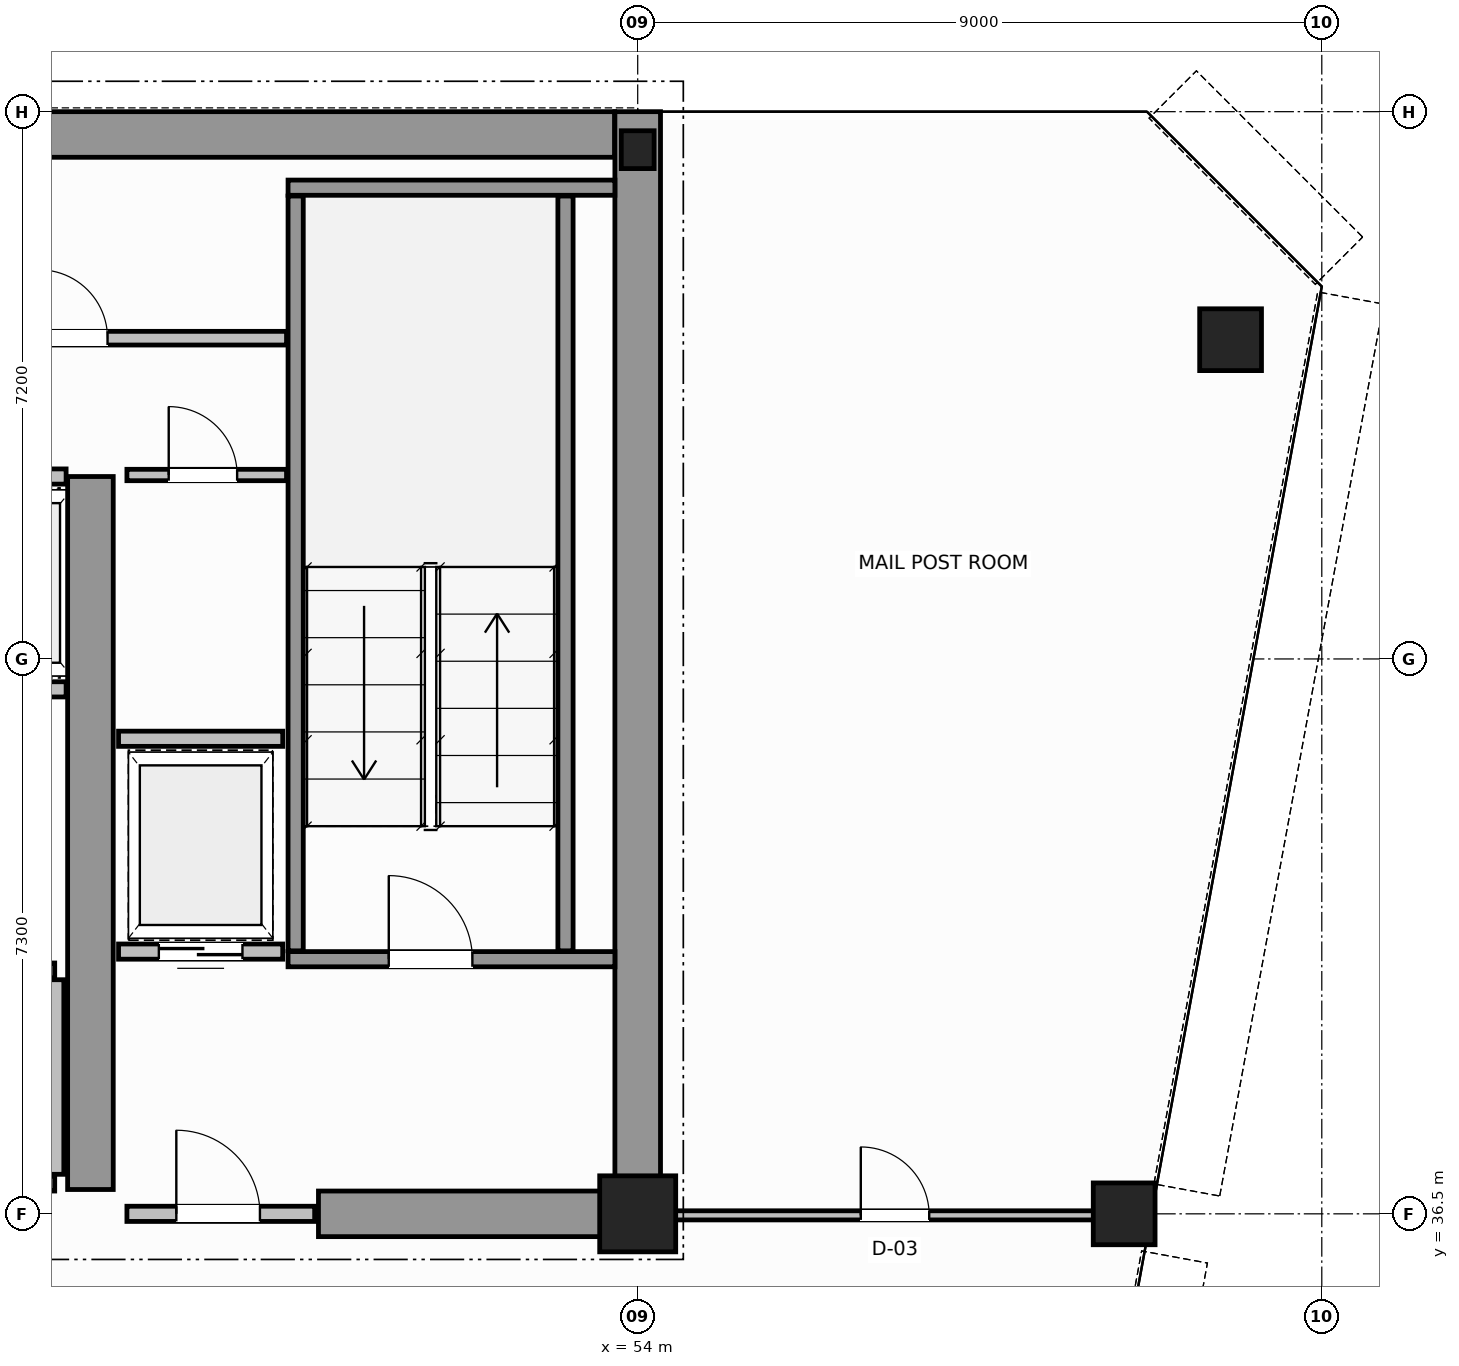
"""IFC4 building model, lengths in metres.
Left out: names, types, materials, properties, quantities, classifications, styles, units other than length and angle.
Written with IfcOpenShell. Run it as: python <this file> out.ifc"""

import sys

from ifc_helpers import new_model, si_unit, direction, frame, frame_2d, origin, origin_2d, place, context, subcontext, project, spatial, rectangle, hollow_circle, i_section, extrude, source, transform, mapped, element, fill, save


model = new_model("IFC4")
c1 = context("Model", 3, precision=1e-05, world=origin(), true_north=direction((0.0, 1.0)))
c2 = subcontext(c1, "Body", "Model", "MODEL_VIEW")
j1 = project(units=[si_unit("LENGTHUNIT", "METRE"), si_unit("PLANEANGLEUNIT", "RADIAN")], contexts=[c1])
p1 = place(None, origin())
s1 = spatial("IfcSite", under=j1, at=p1, CompositionType="ELEMENT")
p2 = place(p1, origin())
s2 = spatial("IfcBuilding", under=s1, at=p2, CompositionType="ELEMENT")
p3 = place(p2, frame((0.0, 0.0, 203.2)))
s3 = spatial("IfcBuildingStorey", under=s2, at=p3, CompositionType="ELEMENT", Elevation=203.2)
m1 = source(origin(), c2, "Body", "SweptSolid", [
    extrude(rectangle(XDim=1.0, YDim=1.0, at=origin_2d()), origin(), (0.0, 0.0, 1.0), 3.8),
])
p4 = place(p3, frame((54.0, 36.5, 0.0), z_axis=(0.0, 0.0, 1.0), x_axis=(1.0, 0.0, 0.0)))
e1 = element("IfcColumn", 1, at=p4, inside=s3, PredefinedType="COLUMN", context=c2, shape_type="MappedRepresentation", body=[
    mapped(m1, transform((0.0, 0.0, 0.0), scale=1.0)),
])
m2 = source(origin(), c2, "Body", "SweptSolid", [
    extrude(i_section(OverallWidth=0.432, OverallDepth=0.498, WebThickness=0.055, FlangeThickness=0.068, FilletRadius=0.015, at=origin_2d()), origin(), (0.0, 0.0, 1.0), 3.8),
])
p5 = place(p3, frame((54.0, 50.5, 0.0), z_axis=(0.0, 0.0, 1.0), x_axis=(1.0, 0.0, 0.0)))
e2 = element("IfcColumn", 2, at=p5, inside=s3, PredefinedType="COLUMN", context=c2, shape_type="MappedRepresentation", body=[
    mapped(m2, transform((0.0, 0.0, 0.0), scale=1.0)),
])
m3 = source(origin(), c2, "Body", "SweptSolid", [
    extrude(hollow_circle(Radius=0.406, WallThickness=0.04, at=origin_2d()), origin(), (0.0, 0.0, 1.0), 3.8),
])
for number, where, z_axis, x_axis in (
    (3, (61.8, 48.0, 0.0), (0.0, 0.0, 1.0), (1.0, 0.0, 0.0)),
    (4, (60.4, 36.5, 0.0), (0.0, 0.0, 1.0), (1.0, 0.0, 0.0)),
):
    element("IfcColumn", number, at=place(p3, frame(where, z_axis=z_axis, x_axis=x_axis)), inside=s3, PredefinedType="COLUMN", context=c2, shape_type="MappedRepresentation", body=[
        mapped(m3, transform((0.0, 0.0, 0.0), scale=1.0)),
    ])
p6 = place(p3, frame((34.002, 50.7, 0.0), z_axis=(0.0, 0.0, 1.0), x_axis=(1.0, 0.0, 0.0)))
e5 = element("IfcWall", 5, at=p6, inside=s3, PredefinedType="SHEAR", context=c2, shape_type="SweptSolid", body=[
    extrude(rectangle(XDim=19.694, YDim=0.6, at=frame_2d((9.847, 0.0))), origin(), (0.0, 0.0, 1.0), 3.8),
])
p7 = place(p3, frame((54.0, 36.5, 0.0), z_axis=(0.0, 0.0, 1.0), x_axis=(0.0, 1.0, 0.0)))
e6 = element("IfcWall", 6, at=p7, inside=s3, PredefinedType="SHEAR", context=c2, shape_type="SweptSolid", body=[
    extrude(rectangle(XDim=14.5, YDim=0.6, at=frame_2d((7.25, 0.0))), origin(), (0.0, 0.0, 1.0), 3.8),
])
p8 = place(p3, frame((49.8, 36.5, 0.0), z_axis=(0.0, 0.0, 1.0), x_axis=(1.0, 0.0, 0.0)))
e7 = element("IfcWall", 7, at=p8, inside=s3, PredefinedType="SHEAR", context=c2, shape_type="SweptSolid", body=[
    extrude(rectangle(XDim=3.88, YDim=0.6, at=frame_2d((1.94, 0.0))), origin(), (0.0, 0.0, 1.0), 2.58),
])
p9 = place(p3, frame((46.8, 36.82, 0.0), z_axis=(0.0, 0.0, 1.0), x_axis=(0.0, 1.0, 0.0)))
e8 = element("IfcWall", 8, at=p9, inside=s3, PredefinedType="SHEAR", context=c2, shape_type="SweptSolid", body=[
    extrude(rectangle(XDim=9.38, YDim=0.6, at=frame_2d((4.69, 0.0))), origin(), (0.0, 0.0, 1.0), 3.8),
])
p10 = place(p3, frame((49.4, 39.85, 0.0), z_axis=(0.0, 0.0, 1.0), x_axis=(1.0, 0.0, 0.0)))
e9 = element("IfcWall", 9, at=p10, inside=s3, PredefinedType="SOLIDWALL", context=c2, shape_type="SweptSolid", body=[
    extrude(rectangle(XDim=4.3, YDim=0.2, at=frame_2d((2.15, 0.0))), origin(), (0.0, 0.0, 1.0), 3.8),
])
p11 = place(p10, frame((1.325, 0.0, 0.0)))
e10 = element("IfcOpeningElement", 10, at=p11, cuts=e9, PredefinedType="OPENING", context=c2, shape_type="SweptSolid", body=[
    extrude(rectangle(XDim=1.1, YDim=2.15, at=frame_2d((0.55, 1.075))), frame((0.0, 0.11, 0.0), z_axis=(0.0, -1.0, 0.0), x_axis=(1.0, 0.0, 0.0)), (0.0, 0.0, 1.0), 0.22),
])
p12 = place(p3, frame((49.4, 50.0, 0.0), z_axis=(0.0, 0.0, 1.0), x_axis=(1.0, 0.0, 0.0)))
e11 = element("IfcWall", 11, at=p12, inside=s3, PredefinedType="SOLIDWALL", context=c2, shape_type="SweptSolid", body=[
    extrude(rectangle(XDim=4.3, YDim=0.2, at=frame_2d((2.15, 0.0))), origin(), (0.0, 0.0, 1.0), 3.8),
])
for number, where, z_axis, x_axis in (
    (12, (49.5, 39.96, 0.0), (0.0, 0.0, 1.0), (0.0, 1.0, 0.0)),
    (13, (53.05, 39.96, 0.0), (0.0, 0.0, 1.0), (0.0, 1.0, 0.0)),
):
    element("IfcWall", number, at=place(p3, frame(where, z_axis=z_axis, x_axis=x_axis)), inside=s3, PredefinedType="SOLIDWALL", context=c2, shape_type="SweptSolid", body=[
        extrude(rectangle(XDim=9.93, YDim=0.2, at=frame_2d((4.965, 0.0))), origin(), (0.0, 0.0, 1.0), 3.8),
    ])
p13 = place(p3, frame((47.28, 36.5, 0.0), z_axis=(0.0, 0.0, 1.0), x_axis=(1.0, 0.0, 0.0)))
e14 = element("IfcWall", 14, at=p13, inside=s3, PredefinedType="SOLIDWALL", context=c2, shape_type="SweptSolid", body=[
    extrude(rectangle(XDim=2.47, YDim=0.2, at=frame_2d((1.235, 0.0))), origin(), (0.0, 0.0, 1.0), 2.57),
])
p14 = place(p13, frame((0.65, 0.0, 0.0)))
e15 = element("IfcOpeningElement", 15, at=p14, cuts=e14, PredefinedType="OPENING", context=c2, shape_type="SweptSolid", body=[
    extrude(rectangle(XDim=1.1, YDim=2.15, at=frame_2d((0.55, 1.075))), frame((0.0, 0.11, 0.0), z_axis=(0.0, -1.0, 0.0), x_axis=(1.0, 0.0, 0.0)), (0.0, 0.0, 1.0), 0.22),
])
p15 = place(p3, frame((44.37, 39.7, 0.0), z_axis=(0.0, 0.0, 1.0), x_axis=(1.0, 0.0, 0.0)))
e16 = element("IfcWall", 16, at=p15, inside=s3, PredefinedType="SOLIDWALL", context=c2, shape_type="SweptSolid", body=[
    extrude(rectangle(XDim=1.96, YDim=0.2, at=frame_2d((0.98, 0.0))), origin(), (0.0, 0.0, 1.0), 3.58),
])
p16 = place(p15, frame((0.43, 0.0, 0.0)))
e17 = element("IfcOpeningElement", 17, at=p16, cuts=e16, PredefinedType="OPENING", context=c2, shape_type="SweptSolid", body=[
    extrude(rectangle(XDim=1.1, YDim=2.15, at=frame_2d((0.55, 1.075))), frame((0.0, 0.11, 0.0), z_axis=(0.0, -1.0, 0.0), x_axis=(1.0, 0.0, 0.0)), (0.0, 0.0, 1.0), 0.22),
])
p17 = place(p3, frame((44.37, 36.9, 0.0), z_axis=(0.0, 0.0, 1.0), x_axis=(1.0, 0.0, 0.0)))
e18 = element("IfcWall", 18, at=p17, inside=s3, PredefinedType="SOLIDWALL", context=c2, shape_type="SweptSolid", body=[
    extrude(rectangle(XDim=1.96, YDim=0.2, at=frame_2d((0.98, 0.0))), origin(), (0.0, 0.0, 1.0), 2.37),
])
p18 = place(p3, frame((46.35, 37.02, 0.0), z_axis=(0.0, 0.0, 1.0), x_axis=(0.0, 1.0, 0.0)))
e19 = element("IfcWall", 19, at=p18, inside=s3, PredefinedType="SOLIDWALL", context=c2, shape_type="SweptSolid", body=[
    extrude(rectangle(XDim=2.56, YDim=0.2, at=frame_2d((1.28, 0.0))), origin(), (0.0, 0.0, 1.0), 3.58),
])
p19 = place(p3, frame((44.62, 43.4, 0.0), z_axis=(0.0, 0.0, 1.0), x_axis=(1.0, 0.0, 0.0)))
e20 = element("IfcWall", 20, at=p19, inside=s3, PredefinedType="SOLIDWALL", context=c2, shape_type="SweptSolid", body=[
    extrude(rectangle(XDim=1.86, YDim=0.2, at=frame_2d((0.93, 0.0))), origin(), (0.0, 0.0, 1.0), 3.58),
])
p20 = place(p19, frame((0.38, 0.0, 0.0)))
e21 = element("IfcOpeningElement", 21, at=p20, cuts=e20, PredefinedType="OPENING", context=c2, shape_type="SweptSolid", body=[
    extrude(rectangle(XDim=1.1, YDim=2.15, at=frame_2d((0.55, 1.075))), frame((0.0, 0.11, 0.0), z_axis=(0.0, -1.0, 0.0), x_axis=(1.0, 0.0, 0.0)), (0.0, 0.0, 1.0), 0.22),
])
p21 = place(p3, frame((44.62, 46.2, 0.0), z_axis=(0.0, 0.0, 1.0), x_axis=(1.0, 0.0, 0.0)))
e22 = element("IfcWall", 22, at=p21, inside=s3, PredefinedType="SOLIDWALL", context=c2, shape_type="SweptSolid", body=[
    extrude(rectangle(XDim=1.86, YDim=0.2, at=frame_2d((0.93, 0.0))), origin(), (0.0, 0.0, 1.0), 3.58),
])
p22 = place(p3, frame((47.17, 39.95, 0.0), z_axis=(0.0, 0.0, 1.0), x_axis=(1.0, 0.0, 0.0)))
e23 = element("IfcWall", 23, at=p22, inside=s3, PredefinedType="SOLIDWALL", context=c2, shape_type="SweptSolid", body=[
    extrude(rectangle(XDim=2.16, YDim=0.2, at=frame_2d((1.08, 0.0))), origin(), (0.0, 0.0, 1.0), 3.58),
])
p23 = place(p22, frame((0.53, 0.0, 0.0)))
e24 = element("IfcOpeningElement", 24, at=p23, cuts=e23, PredefinedType="OPENING", context=c2, shape_type="SweptSolid", body=[
    extrude(rectangle(XDim=1.1, YDim=2.15, at=frame_2d((0.55, 1.075))), frame((0.0, 0.11, 0.0), z_axis=(0.0, -1.0, 0.0), x_axis=(1.0, 0.0, 0.0)), (0.0, 0.0, 1.0), 0.22),
])
p24 = place(p3, frame((47.17, 42.75, 0.0), z_axis=(0.0, 0.0, 1.0), x_axis=(1.0, 0.0, 0.0)))
e25 = element("IfcWall", 25, at=p24, inside=s3, PredefinedType="SOLIDWALL", context=c2, shape_type="SweptSolid", body=[
    extrude(rectangle(XDim=2.16, YDim=0.2, at=frame_2d((1.08, 0.0))), origin(), (0.0, 0.0, 1.0), 3.58),
])
p25 = place(p3, frame((47.28, 46.22, 0.0), z_axis=(0.0, 0.0, 1.0), x_axis=(1.0, 0.0, 0.0)))
e26 = element("IfcWall", 26, at=p25, inside=s3, PredefinedType="PARTITIONING", context=c2, shape_type="SweptSolid", body=[
    extrude(rectangle(XDim=2.1, YDim=0.15, at=frame_2d((1.05, 0.0))), origin(), (0.0, 0.0, 1.0), 3.58),
])
p26 = place(p25, frame((0.55, 0.0, 0.0)))
e27 = element("IfcOpeningElement", 27, at=p26, cuts=e26, PredefinedType="OPENING", context=c2, shape_type="SweptSolid", body=[
    extrude(rectangle(XDim=0.9, YDim=2.1, at=frame_2d((0.45, 1.05))), frame((0.0, 0.085, 0.0), z_axis=(0.0, -1.0, 0.0), x_axis=(1.0, 0.0, 0.0)), (0.0, 0.0, 1.0), 0.17),
])
p27 = place(p3, frame((18.62, 48.02, 0.0), z_axis=(0.0, 0.0, 1.0), x_axis=(1.0, 0.0, 0.0)))
e28 = element("IfcWall", 28, at=p27, inside=s3, PredefinedType="PLUMBINGWALL", context=c2, shape_type="SweptSolid", body=[
    extrude(rectangle(XDim=30.76, YDim=0.18, at=frame_2d((15.38, 0.0))), origin(), (0.0, 0.0, 1.0), 3.58),
])
p28 = place(p27, frame((1.655, 0.0, 0.0)))
e29 = element("IfcOpeningElement", 29, at=p28, cuts=e28, PredefinedType="OPENING", context=c2, shape_type="SweptSolid", body=[
    extrude(rectangle(XDim=0.9, YDim=2.15, at=frame_2d((0.45, 1.075))), frame((0.0, 0.1, 0.0), z_axis=(0.0, -1.0, 0.0), x_axis=(1.0, 0.0, 0.0)), (0.0, 0.0, 1.0), 0.2),
])
p29 = place(p27, frame((6.03, 0.0, 0.0)))
e30 = element("IfcOpeningElement", 30, at=p29, cuts=e28, PredefinedType="OPENING", context=c2, shape_type="SweptSolid", body=[
    extrude(rectangle(XDim=0.9, YDim=2.15, at=frame_2d((0.45, 1.075))), frame((0.0, 0.1, 0.0), z_axis=(0.0, -1.0, 0.0), x_axis=(1.0, 0.0, 0.0)), (0.0, 0.0, 1.0), 0.2),
])
p30 = place(p27, frame((10.93, 0.0, 0.0)))
e31 = element("IfcOpeningElement", 31, at=p30, cuts=e28, PredefinedType="OPENING", context=c2, shape_type="SweptSolid", body=[
    extrude(rectangle(XDim=0.9, YDim=2.15, at=frame_2d((0.45, 1.075))), frame((0.0, 0.1, 0.0), z_axis=(0.0, -1.0, 0.0), x_axis=(1.0, 0.0, 0.0)), (0.0, 0.0, 1.0), 0.2),
])
p31 = place(p27, frame((16.13, 0.0, 0.0)))
e32 = element("IfcOpeningElement", 32, at=p31, cuts=e28, PredefinedType="OPENING", context=c2, shape_type="SweptSolid", body=[
    extrude(rectangle(XDim=0.9, YDim=2.15, at=frame_2d((0.45, 1.075))), frame((0.0, 0.1, 0.0), z_axis=(0.0, -1.0, 0.0), x_axis=(1.0, 0.0, 0.0)), (0.0, 0.0, 1.0), 0.2),
])
p32 = place(p27, frame((21.73, 0.0, 0.0)))
e33 = element("IfcOpeningElement", 33, at=p32, cuts=e28, PredefinedType="OPENING", context=c2, shape_type="SweptSolid", body=[
    extrude(rectangle(XDim=0.9, YDim=2.15, at=frame_2d((0.45, 1.075))), frame((0.0, 0.1, 0.0), z_axis=(0.0, -1.0, 0.0), x_axis=(1.0, 0.0, 0.0)), (0.0, 0.0, 1.0), 0.2),
])
p33 = place(p27, frame((27.505, 0.0, 0.0)))
e34 = element("IfcOpeningElement", 34, at=p33, cuts=e28, PredefinedType="OPENING", context=c2, shape_type="SweptSolid", body=[
    extrude(rectangle(XDim=0.9, YDim=2.15, at=frame_2d((0.45, 1.075))), frame((0.0, 0.1, 0.0), z_axis=(0.0, -1.0, 0.0), x_axis=(1.0, 0.0, 0.0)), (0.0, 0.0, 1.0), 0.2),
])
p34 = place(p3, frame((54.06, 36.48, 0.0), z_axis=(0.0, 0.0, 1.0), x_axis=(1.0, 0.0, 0.0)))
e35 = element("IfcWall", 35, at=p34, inside=s3, PredefinedType="PARTITIONING", context=c2, shape_type="SweptSolid", body=[
    extrude(rectangle(XDim=6.651, YDim=0.12, at=frame_2d((3.325, 0.0))), origin(), (0.0, 0.0, 1.0), 2.37),
])
p35 = place(p34, frame((2.875, 0.0, 0.0)))
e36 = element("IfcOpeningElement", 36, at=p35, cuts=e35, PredefinedType="OPENING", context=c2, shape_type="SweptSolid", body=[
    extrude(rectangle(XDim=0.9, YDim=2.15, at=frame_2d((0.45, 1.075))), frame((0.0, 0.07, 0.0), z_axis=(0.0, -1.0, 0.0), x_axis=(1.0, 0.0, 0.0)), (0.0, 0.0, 1.0), 0.14),
])
m4 = source(origin(), c2, "Body", "SweptSolid", [
    extrude(rectangle(XDim=1.1, YDim=2.15, at=frame_2d((0.55, 1.075))), frame((0.0, 0.025, 0.0), z_axis=(0.0, -1.0, 0.0), x_axis=(1.0, 0.0, 0.0)), (0.0, 0.0, 1.0), 0.05),
])
p36 = place(p11, origin())
e37 = element("IfcDoor", 37, at=p36, inside=s3, OperationType="SINGLE_SWING_RIGHT", PredefinedType="DOOR", context=c2, shape_type="MappedRepresentation", body=[
    mapped(m4, transform((0.0, 0.0, 0.0), scale=1.0)),
])
fill(e10, e37)
p37 = place(p14, origin())
e38 = element("IfcDoor", 38, at=p37, inside=s3, OperationType="SINGLE_SWING_LEFT", PredefinedType="DOOR", context=c2, shape_type="MappedRepresentation", body=[
    mapped(m4, transform((0.0, 0.0, 0.0), scale=1.0)),
])
fill(e15, e38)
p38 = place(p23, origin())
e39 = element("IfcDoor", 39, at=p38, inside=s3, OperationType="DOUBLE_DOOR_SLIDING", PredefinedType="DOOR", context=c2, shape_type="MappedRepresentation", body=[
    mapped(m4, transform((0.0, 0.0, 0.0), scale=1.0)),
])
fill(e24, e39)
m5 = source(origin(), c2, "Body", "SweptSolid", [
    extrude(rectangle(XDim=0.9, YDim=2.1, at=frame_2d((0.45, 1.05))), frame((0.0, 0.025, 0.0), z_axis=(0.0, -1.0, 0.0), x_axis=(1.0, 0.0, 0.0)), (0.0, 0.0, 1.0), 0.05),
])
p39 = place(p26, origin())
e40 = element("IfcDoor", 40, at=p39, inside=s3, OperationType="SINGLE_SWING_RIGHT", PredefinedType="DOOR", context=c2, shape_type="MappedRepresentation", body=[
    mapped(m5, transform((0.0, 0.0, 0.0), scale=1.0)),
])
fill(e27, e40)
m6 = source(origin(), c2, "Body", "SweptSolid", [
    extrude(rectangle(XDim=0.9, YDim=2.15, at=frame_2d((0.45, 1.075))), frame((0.0, 0.025, 0.0), z_axis=(0.0, -1.0, 0.0), x_axis=(1.0, 0.0, 0.0)), (0.0, 0.0, 1.0), 0.05),
])
p40 = place(p33, origin())
e41 = element("IfcDoor", 41, at=p40, inside=s3, OperationType="SINGLE_SWING_RIGHT", PredefinedType="DOOR", context=c2, shape_type="MappedRepresentation", body=[
    mapped(m6, transform((0.0, 0.0, 0.0), scale=1.0)),
])
fill(e34, e41)
p41 = place(p35, origin())
e42 = element("IfcDoor", 42, at=p41, inside=s3, OperationType="SINGLE_SWING_RIGHT", PredefinedType="DOOR", context=c2, shape_type="MappedRepresentation", body=[
    mapped(m6, transform((0.0, 0.0, 0.0), scale=1.0)),
])
fill(e36, e42)
save(model, sys.argv[1])
